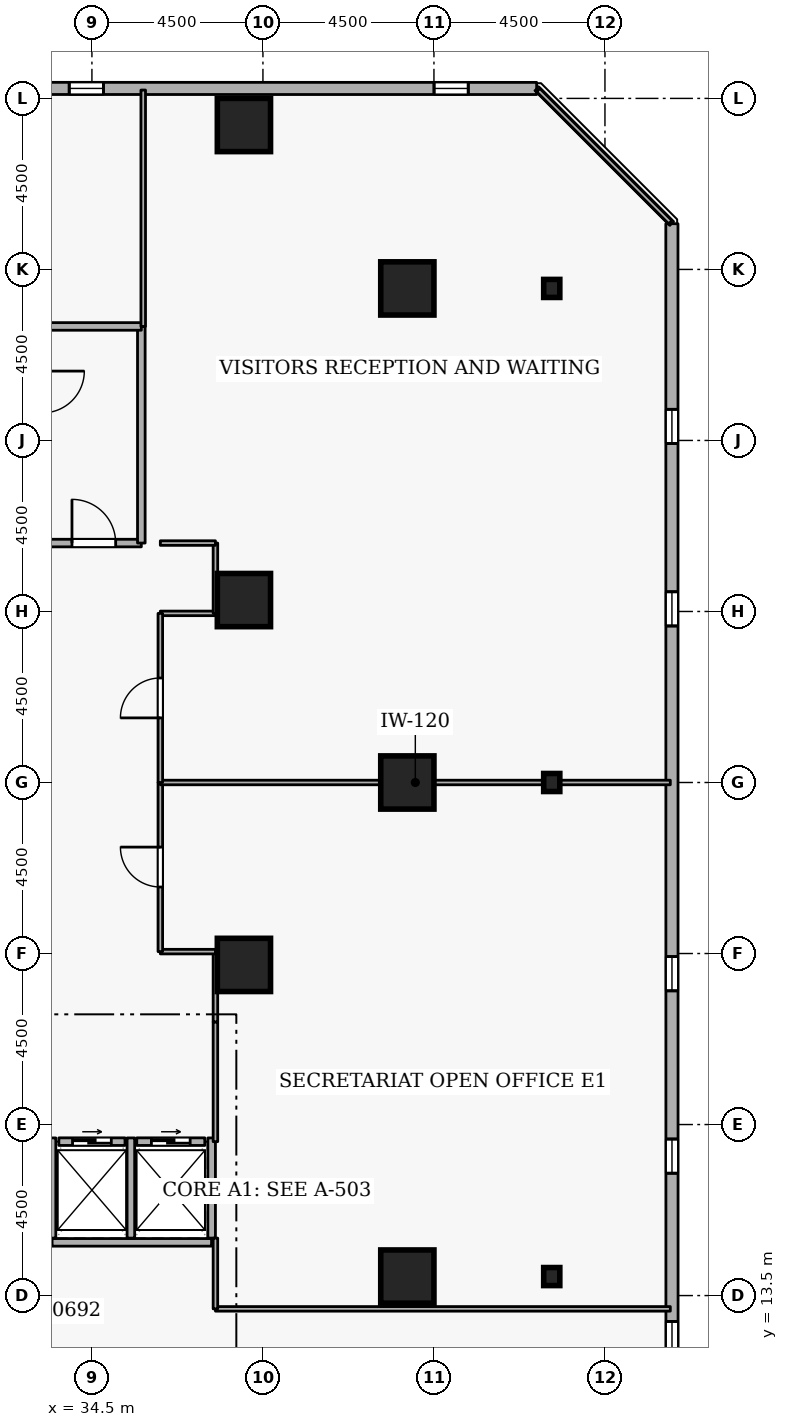
"""IFC4 building model, lengths in metres.
Left out: names, types, materials, properties, quantities, classifications, styles, units other than length and angle.
Written with IfcOpenShell. Run it as: python <this file> out.ifc"""

import sys

from ifc_helpers import new_model, si_unit, direction, frame, frame_2d, origin, origin_2d, place, context, subcontext, project, spatial, rectangle, i_section, extrude, element, fill, save


model = new_model("IFC4")
c1 = context("Model", 3, precision=1e-05, world=origin(), true_north=direction((0.0, 1.0)))
c2 = subcontext(c1, "Body", "Model", "MODEL_VIEW")
j1 = project(units=[si_unit("LENGTHUNIT", "METRE"), si_unit("PLANEANGLEUNIT", "RADIAN")], contexts=[c1])
p1 = place(None, origin())
s1 = spatial("IfcSite", under=j1, at=p1, CompositionType="ELEMENT")
p2 = place(p1, origin())
s2 = spatial("IfcBuilding", under=s1, at=p2, CompositionType="ELEMENT")
p3 = place(p2, frame((0.0, 0.0, 57.3)))
s3 = spatial("IfcBuildingStorey", under=s2, at=p3, CompositionType="ELEMENT", Elevation=57.3)
for number, where, z_axis, x_axis in (
    (1, (42.8, 14.0, 0.0), (0.0, 0.0, 1.0), (1.0, 0.0, 0.0)),
    (2, (42.8, 27.0, 0.0), (0.0, 0.0, 1.0), (1.0, 0.0, 0.0)),
    (3, (42.8, 40.0, 0.0), (0.0, 0.0, 1.0), (1.0, 0.0, 0.0)),
    (4, (38.5, 44.3, 0.0), (0.0, 0.0, 1.0), (1.0, 0.0, 0.0)),
    (5, (38.5, 22.2, 0.0), (0.0, 0.0, 1.0), (1.0, 0.0, 0.0)),
    (6, (38.5, 31.8, 0.0), (0.0, 0.0, 1.0), (1.0, 0.0, 0.0)),
):
    element("IfcColumn", number, at=place(p3, frame(where, z_axis=z_axis, x_axis=x_axis)), inside=s3, PredefinedType="COLUMN", context=c2, shape_type="SweptSolid", body=[
        extrude(rectangle(XDim=1.4, YDim=1.4, at=origin_2d()), origin(), (0.0, 0.0, 1.0), 3.6),
    ])
for number, where, z_axis, x_axis in (
    (7, (46.6, 14.0, 0.0), (0.0, 0.0, 1.0), (1.0, 0.0, 0.0)),
    (8, (46.6, 27.0, 0.0), (0.0, 0.0, 1.0), (1.0, 0.0, 0.0)),
    (9, (46.6, 40.0, 0.0), (0.0, 0.0, 1.0), (1.0, 0.0, 0.0)),
):
    element("IfcColumn", number, at=place(p3, frame(where, z_axis=z_axis, x_axis=x_axis)), inside=s3, PredefinedType="COLUMN", context=c2, shape_type="SweptSolid", body=[
        extrude(i_section(OverallWidth=0.424, OverallDepth=0.475, WebThickness=0.048, FlangeThickness=0.077, FilletRadius=0.015, at=origin_2d()), origin(), (0.0, 0.0, 1.0), 3.6),
    ])
p4 = place(p3, frame((49.765, 5.319, 0.0), z_axis=(0.0, 0.0, 1.0), x_axis=(-8.7231344e-05, 0.999999996195, 0.0)))
e10 = element("IfcWall", 10, at=p4, inside=s3, PredefinedType="STANDARD", context=c2, shape_type="SweptSolid", body=[
    extrude(rectangle(XDim=36.384, YDim=0.32, at=frame_2d((18.192, 0.0))), origin(), (0.0, 0.0, 1.0), 2.7),
])
p5 = place(p4, frame((1.8, 0.0, 0.72)))
e11 = element("IfcOpeningElement", 11, at=p5, cuts=e10, PredefinedType="OPENING", context=c2, shape_type="SweptSolid", body=[
    extrude(rectangle(XDim=0.9, YDim=1.75, at=frame_2d((0.45, 0.875))), frame((0.0, 0.17, 0.0), z_axis=(0.0, -1.0, 0.0), x_axis=(1.0, 0.0, 0.0)), (0.0, 0.0, 1.0), 0.34),
])
p6 = place(p4, frame((6.6, 0.0, 0.72)))
e12 = element("IfcOpeningElement", 12, at=p6, cuts=e10, PredefinedType="OPENING", context=c2, shape_type="SweptSolid", body=[
    extrude(rectangle(XDim=0.9, YDim=1.75, at=frame_2d((0.45, 0.875))), frame((0.0, 0.17, 0.0), z_axis=(0.0, -1.0, 0.0), x_axis=(1.0, 0.0, 0.0)), (0.0, 0.0, 1.0), 0.34),
])
p7 = place(p4, frame((11.4, 0.0, 0.72)))
e13 = element("IfcOpeningElement", 13, at=p7, cuts=e10, PredefinedType="OPENING", context=c2, shape_type="SweptSolid", body=[
    extrude(rectangle(XDim=0.9, YDim=1.75, at=frame_2d((0.45, 0.875))), frame((0.0, 0.17, 0.0), z_axis=(0.0, -1.0, 0.0), x_axis=(1.0, 0.0, 0.0)), (0.0, 0.0, 1.0), 0.34),
])
p8 = place(p4, frame((16.2, 0.0, 0.72)))
e14 = element("IfcOpeningElement", 14, at=p8, cuts=e10, PredefinedType="OPENING", context=c2, shape_type="SweptSolid", body=[
    extrude(rectangle(XDim=0.9, YDim=1.75, at=frame_2d((0.45, 0.875))), frame((0.0, 0.17, 0.0), z_axis=(0.0, -1.0, 0.0), x_axis=(1.0, 0.0, 0.0)), (0.0, 0.0, 1.0), 0.34),
])
p9 = place(p4, frame((25.8, 0.0, 0.72)))
e15 = element("IfcOpeningElement", 15, at=p9, cuts=e10, PredefinedType="OPENING", context=c2, shape_type="SweptSolid", body=[
    extrude(rectangle(XDim=0.9, YDim=1.75, at=frame_2d((0.45, 0.875))), frame((0.0, 0.17, 0.0), z_axis=(0.0, -1.0, 0.0), x_axis=(1.0, 0.0, 0.0)), (0.0, 0.0, 1.0), 0.34),
])
p10 = place(p4, frame((30.6, 0.0, 0.72)))
e16 = element("IfcOpeningElement", 16, at=p10, cuts=e10, PredefinedType="OPENING", context=c2, shape_type="SweptSolid", body=[
    extrude(rectangle(XDim=0.9, YDim=1.75, at=frame_2d((0.45, 0.875))), frame((0.0, 0.17, 0.0), z_axis=(0.0, -1.0, 0.0), x_axis=(1.0, 0.0, 0.0)), (0.0, 0.0, 1.0), 0.34),
])
p11 = place(p3, frame((46.203, 45.262, 0.0), z_axis=(0.0, 0.0, 1.0), x_axis=(-0.999999996195, 8.7231344e-05, 0.0)))
e17 = element("IfcWall", 17, at=p11, inside=s3, PredefinedType="STANDARD", context=c2, shape_type="SweptSolid", body=[
    extrude(rectangle(XDim=36.384, YDim=0.32, at=frame_2d((18.192, 0.0))), origin(), (0.0, 0.0, 1.0), 2.7),
])
p12 = place(p11, frame((1.8, 0.0, 0.72)))
e18 = element("IfcOpeningElement", 18, at=p12, cuts=e17, PredefinedType="OPENING", context=c2, shape_type="SweptSolid", body=[
    extrude(rectangle(XDim=0.9, YDim=1.75, at=frame_2d((0.45, 0.875))), frame((0.0, 0.17, 0.0), z_axis=(0.0, -1.0, 0.0), x_axis=(1.0, 0.0, 0.0)), (0.0, 0.0, 1.0), 0.34),
])
p13 = place(p11, frame((11.4, 0.0, 0.72)))
e19 = element("IfcOpeningElement", 19, at=p13, cuts=e17, PredefinedType="OPENING", context=c2, shape_type="SweptSolid", body=[
    extrude(rectangle(XDim=0.9, YDim=1.75, at=frame_2d((0.45, 0.875))), frame((0.0, 0.17, 0.0), z_axis=(0.0, -1.0, 0.0), x_axis=(1.0, 0.0, 0.0)), (0.0, 0.0, 1.0), 0.34),
])
p14 = place(p11, frame((16.2, 0.0, 0.72)))
e20 = element("IfcOpeningElement", 20, at=p14, cuts=e17, PredefinedType="OPENING", context=c2, shape_type="SweptSolid", body=[
    extrude(rectangle(XDim=0.9, YDim=1.75, at=frame_2d((0.45, 0.875))), frame((0.0, 0.17, 0.0), z_axis=(0.0, -1.0, 0.0), x_axis=(1.0, 0.0, 0.0)), (0.0, 0.0, 1.0), 0.34),
])
p15 = place(p11, frame((25.8, 0.0, 0.72)))
e21 = element("IfcOpeningElement", 21, at=p15, cuts=e17, PredefinedType="OPENING", context=c2, shape_type="SweptSolid", body=[
    extrude(rectangle(XDim=0.9, YDim=1.75, at=frame_2d((0.45, 0.875))), frame((0.0, 0.17, 0.0), z_axis=(0.0, -1.0, 0.0), x_axis=(1.0, 0.0, 0.0)), (0.0, 0.0, 1.0), 0.34),
])
p16 = place(p11, frame((30.6, 0.0, 0.72)))
e22 = element("IfcOpeningElement", 22, at=p16, cuts=e17, PredefinedType="OPENING", context=c2, shape_type="SweptSolid", body=[
    extrude(rectangle(XDim=0.9, YDim=1.75, at=frame_2d((0.45, 0.875))), frame((0.0, 0.17, 0.0), z_axis=(0.0, -1.0, 0.0), x_axis=(1.0, 0.0, 0.0)), (0.0, 0.0, 1.0), 0.34),
])
p17 = place(p3, frame((33.63, 17.55, 0.0), z_axis=(0.0, 0.0, 1.0), x_axis=(1.0, 0.0, 0.0)))
e23 = element("IfcWall", 23, at=p17, inside=s3, PredefinedType="STANDARD", context=c2, shape_type="SweptSolid", body=[
    extrude(rectangle(XDim=1.74, YDim=0.2, at=frame_2d((0.87, 0.0))), origin(), (0.0, 0.0, 1.0), 3.34),
])
p18 = place(p17, frame((0.36, 0.0, 0.0)))
e24 = element("IfcOpeningElement", 24, at=p18, cuts=e23, PredefinedType="OPENING", context=c2, shape_type="SweptSolid", body=[
    extrude(rectangle(XDim=1.02, YDim=2.06, at=frame_2d((0.51, 1.03))), frame((0.0, 0.11, 0.0), z_axis=(0.0, -1.0, 0.0), x_axis=(1.0, 0.0, 0.0)), (0.0, 0.0, 1.0), 0.22),
])
p19 = place(p3, frame((35.68, 17.55, 0.0), z_axis=(0.0, 0.0, 1.0), x_axis=(1.0, 0.0, 0.0)))
e25 = element("IfcWall", 25, at=p19, inside=s3, PredefinedType="STANDARD", context=c2, shape_type="SweptSolid", body=[
    extrude(rectangle(XDim=1.79, YDim=0.2, at=frame_2d((0.895, 0.0))), origin(), (0.0, 0.0, 1.0), 3.34),
])
p20 = place(p19, frame((0.385, 0.0, 0.0)))
e26 = element("IfcOpeningElement", 26, at=p20, cuts=e25, PredefinedType="OPENING", context=c2, shape_type="SweptSolid", body=[
    extrude(rectangle(XDim=1.02, YDim=2.06, at=frame_2d((0.51, 1.03))), frame((0.0, 0.11, 0.0), z_axis=(0.0, -1.0, 0.0), x_axis=(1.0, 0.0, 0.0)), (0.0, 0.0, 1.0), 0.22),
])
p21 = place(p3, frame((33.452, 14.9, 0.0), z_axis=(0.0, 0.0, 1.0), x_axis=(1.0, 0.0, 0.0)))
e27 = element("IfcWall", 27, at=p21, inside=s3, PredefinedType="STANDARD", context=c2, shape_type="SweptSolid", body=[
    extrude(rectangle(XDim=4.196, YDim=0.2, at=frame_2d((2.098, 0.0))), origin(), (0.0, 0.0, 1.0), 3.34),
])
for number, where, z_axis, x_axis in (
    (28, (35.525, 15.012, 0.0), (0.0, 0.0, 1.0), (0.0, 1.0, 0.0)),
    (29, (33.45, 15.012, 0.0), (0.0, 0.0, 1.0), (0.0, 1.0, 0.0)),
    (30, (37.65, 15.012, 0.0), (0.0, 0.0, 1.0), (0.0, 1.0, 0.0)),
):
    element("IfcWall", number, at=place(p3, frame(where, z_axis=z_axis, x_axis=x_axis)), inside=s3, PredefinedType="STANDARD", context=c2, shape_type="SweptSolid", body=[
        extrude(rectangle(XDim=2.636, YDim=0.2, at=frame_2d((1.318, 0.0))), origin(), (0.0, 0.0, 1.0), 3.34),
    ])
p22 = place(p3, frame((33.3, 33.3, 0.0), z_axis=(0.0, 0.0, 1.0), x_axis=(1.0, 0.0, 0.0)))
e31 = element("IfcWall", 31, at=p22, inside=s3, PredefinedType="STANDARD", context=c2, shape_type="SweptSolid", body=[
    extrude(rectangle(XDim=2.5, YDim=0.2, at=frame_2d((1.25, 0.0))), origin(), (0.0, 0.0, 1.0), 3.34),
])
p23 = place(p22, frame((0.675, 0.0, 0.0)))
e32 = element("IfcOpeningElement", 32, at=p23, cuts=e31, PredefinedType="OPENING", context=c2, shape_type="SweptSolid", body=[
    extrude(rectangle(XDim=1.15, YDim=2.1, at=frame_2d((0.575, 1.05))), frame((0.0, 0.11, 0.0), z_axis=(0.0, -1.0, 0.0), x_axis=(1.0, 0.0, 0.0)), (0.0, 0.0, 1.0), 0.22),
])
p24 = place(p3, frame((35.8, 33.3, 0.0), z_axis=(0.0, 0.0, 1.0), x_axis=(0.0, 1.0, 0.0)))
e33 = element("IfcWall", 33, at=p24, inside=s3, PredefinedType="STANDARD", context=c2, shape_type="SweptSolid", body=[
    extrude(rectangle(XDim=5.7, YDim=0.2, at=frame_2d((2.85, 0.0))), origin(), (0.0, 0.0, 1.0), 3.34),
])
p25 = place(p3, frame((35.8, 39.0, 0.0), z_axis=(0.0, 0.0, 1.0), x_axis=(-1.0, 0.0, 0.0)))
e34 = element("IfcWall", 34, at=p25, inside=s3, PredefinedType="STANDARD", context=c2, shape_type="SweptSolid", body=[
    extrude(rectangle(XDim=2.5, YDim=0.2, at=frame_2d((1.25, 0.0))), origin(), (0.0, 0.0, 1.0), 3.34),
])
p26 = place(p3, frame((37.75, 17.55, 0.0), z_axis=(0.0, 0.0, 1.0), x_axis=(0.0, 1.0, 0.0)))
e35 = element("IfcWall", 35, at=p26, inside=s3, PredefinedType="PARTITIONING", context=c2, shape_type="SweptSolid", body=[
    extrude(rectangle(XDim=3.15, YDim=0.12, at=frame_2d((1.575, 0.0))), origin(), (0.0, 0.0, 1.0), 3.34),
])
p27 = place(p3, frame((37.75, 20.7, 0.0), z_axis=(0.0, 0.0, 1.0), x_axis=(0.0, 1.0, 0.0)))
e36 = element("IfcWall", 36, at=p27, inside=s3, PredefinedType="PARTITIONING", context=c2, shape_type="SweptSolid", body=[
    extrude(rectangle(XDim=1.85, YDim=0.12, at=frame_2d((0.925, 0.0))), origin(), (0.0, 0.0, 1.0), 3.34),
])
p28 = place(p3, frame((37.75, 22.55, 0.0), z_axis=(0.0, 0.0, 1.0), x_axis=(-1.0, 0.0, 0.0)))
e37 = element("IfcWall", 37, at=p28, inside=s3, PredefinedType="PARTITIONING", context=c2, shape_type="SweptSolid", body=[
    extrude(rectangle(XDim=1.45, YDim=0.12, at=frame_2d((0.725, 0.0))), origin(), (0.0, 0.0, 1.0), 3.34),
])
p29 = place(p3, frame((36.3, 22.55, 0.0), z_axis=(0.0, 0.0, 1.0), x_axis=(0.0, 1.0, 0.0)))
e38 = element("IfcWall", 38, at=p29, inside=s3, PredefinedType="PARTITIONING", context=c2, shape_type="SweptSolid", body=[
    extrude(rectangle(XDim=4.45, YDim=0.12, at=frame_2d((2.225, 0.0))), origin(), (0.0, 0.0, 1.0), 3.34),
])
p30 = place(p29, frame((1.7, 0.0, 0.0)))
e39 = element("IfcOpeningElement", 39, at=p30, cuts=e38, PredefinedType="OPENING", context=c2, shape_type="SweptSolid", body=[
    extrude(rectangle(XDim=1.05, YDim=2.1, at=frame_2d((0.525, 1.05))), frame((0.0, 0.07, 0.0), z_axis=(0.0, -1.0, 0.0), x_axis=(1.0, 0.0, 0.0)), (0.0, 0.0, 1.0), 0.14),
])
p31 = place(p3, frame((36.3, 27.0, 0.0), z_axis=(0.0, 0.0, 1.0), x_axis=(1.0, 0.0, 0.0)))
e40 = element("IfcWall", 40, at=p31, inside=s3, PredefinedType="PARTITIONING", context=c2, shape_type="SweptSolid", body=[
    extrude(rectangle(XDim=13.42, YDim=0.12, at=frame_2d((6.71, 0.0))), origin(), (0.0, 0.0, 1.0), 2.932),
])
p32 = place(p3, frame((49.72, 13.15, 0.0), z_axis=(0.0, 0.0, 1.0), x_axis=(-1.0, 0.0, 0.0)))
e41 = element("IfcWall", 41, at=p32, inside=s3, PredefinedType="PARTITIONING", context=c2, shape_type="SweptSolid", body=[
    extrude(rectangle(XDim=11.97, YDim=0.12, at=frame_2d((5.985, 0.0))), origin(), (0.0, 0.0, 1.0), 3.34),
])
p33 = place(p3, frame((37.75, 13.15, 0.0), z_axis=(0.0, 0.0, 1.0), x_axis=(0.0, 1.0, 0.0)))
e42 = element("IfcWall", 42, at=p33, inside=s3, PredefinedType="PARTITIONING", context=c2, shape_type="SweptSolid", body=[
    extrude(rectangle(XDim=1.862, YDim=0.12, at=frame_2d((0.931, 0.0))), origin(), (0.0, 0.0, 1.0), 3.34),
])
p34 = place(p3, frame((36.3, 31.45, 0.0), z_axis=(0.0, 0.0, 1.0), x_axis=(1.0, 0.0, 0.0)))
e43 = element("IfcWall", 43, at=p34, inside=s3, PredefinedType="PARTITIONING", context=c2, shape_type="SweptSolid", body=[
    extrude(rectangle(XDim=1.45, YDim=0.12, at=frame_2d((0.725, 0.0))), origin(), (0.0, 0.0, 1.0), 3.34),
])
p35 = place(p3, frame((37.75, 31.45, 0.0), z_axis=(0.0, 0.0, 1.0), x_axis=(0.0, 1.0, 0.0)))
e44 = element("IfcWall", 44, at=p35, inside=s3, PredefinedType="PARTITIONING", context=c2, shape_type="SweptSolid", body=[
    extrude(rectangle(XDim=1.85, YDim=0.12, at=frame_2d((0.925, 0.0))), origin(), (0.0, 0.0, 1.0), 3.34),
])
p36 = place(p3, frame((37.75, 33.3, 0.0), z_axis=(0.0, 0.0, 1.0), x_axis=(-1.0, 0.0, 0.0)))
e45 = element("IfcWall", 45, at=p36, inside=s3, PredefinedType="PARTITIONING", context=c2, shape_type="SweptSolid", body=[
    extrude(rectangle(XDim=1.45, YDim=0.12, at=frame_2d((0.725, 0.0))), origin(), (0.0, 0.0, 1.0), 3.34),
])
p37 = place(p3, frame((35.85, 39.0, 0.0), z_axis=(0.0, 0.0, 1.0), x_axis=(0.0, 1.0, 0.0)))
e46 = element("IfcWall", 46, at=p37, inside=s3, PredefinedType="PARTITIONING", context=c2, shape_type="SweptSolid", body=[
    extrude(rectangle(XDim=6.22, YDim=0.12, at=frame_2d((3.11, 0.0))), origin(), (0.0, 0.0, 1.0), 3.34),
])
p38 = place(p3, frame((46.243, 45.22, 0.0), z_axis=(0.0, 0.0, 1.0), x_axis=(0.707106781187, -0.707106781187, 0.0)))
e47 = element("IfcWall", 47, at=p38, inside=s3, PredefinedType="PARTITIONING", context=c2, shape_type="SweptSolid", body=[
    extrude(rectangle(XDim=4.917, YDim=0.12, at=frame_2d((2.458, 0.0))), origin(), (0.0, 0.0, 1.0), 3.34),
])
p39 = place(p3, frame((36.3, 27.0, 0.0), z_axis=(0.0, 0.0, 1.0), x_axis=(0.0, 1.0, 0.0)))
e48 = element("IfcWall", 48, at=p39, inside=s3, PredefinedType="PARTITIONING", context=c2, shape_type="SweptSolid", body=[
    extrude(rectangle(XDim=4.45, YDim=0.12, at=frame_2d((2.225, 0.0))), origin(), (0.0, 0.0, 1.0), 3.34),
])
p40 = place(p39, frame((1.7, 0.0, 0.0)))
e49 = element("IfcOpeningElement", 49, at=p40, cuts=e48, PredefinedType="OPENING", context=c2, shape_type="SweptSolid", body=[
    extrude(rectangle(XDim=1.05, YDim=2.1, at=frame_2d((0.525, 1.05))), frame((0.0, 0.07, 0.0), z_axis=(0.0, -1.0, 0.0), x_axis=(1.0, 0.0, 0.0)), (0.0, 0.0, 1.0), 0.14),
])
p41 = place(p6, origin())
e50 = element("IfcWindow", 50, at=p41, inside=s3, PartitioningType="SINGLE_PANEL", PredefinedType="WINDOW", context=c2, shape_type="SweptSolid", body=[
    extrude(rectangle(XDim=0.9, YDim=1.75, at=frame_2d((0.45, 0.875))), frame((0.0, 0.03, 0.0), z_axis=(0.0, -1.0, 0.0), x_axis=(1.0, 0.0, 0.0)), (0.0, 0.0, 1.0), 0.06),
])
fill(e12, e50)
p42 = place(p7, origin())
e51 = element("IfcWindow", 51, at=p42, inside=s3, PartitioningType="SINGLE_PANEL", PredefinedType="WINDOW", context=c2, shape_type="SweptSolid", body=[
    extrude(rectangle(XDim=0.9, YDim=1.75, at=frame_2d((0.45, 0.875))), frame((0.0, 0.03, 0.0), z_axis=(0.0, -1.0, 0.0), x_axis=(1.0, 0.0, 0.0)), (0.0, 0.0, 1.0), 0.06),
])
fill(e13, e51)
p43 = place(p8, origin())
e52 = element("IfcWindow", 52, at=p43, inside=s3, PartitioningType="SINGLE_PANEL", PredefinedType="WINDOW", context=c2, shape_type="SweptSolid", body=[
    extrude(rectangle(XDim=0.9, YDim=1.75, at=frame_2d((0.45, 0.875))), frame((0.0, 0.03, 0.0), z_axis=(0.0, -1.0, 0.0), x_axis=(1.0, 0.0, 0.0)), (0.0, 0.0, 1.0), 0.06),
])
fill(e14, e52)
p44 = place(p9, origin())
e53 = element("IfcWindow", 53, at=p44, inside=s3, PartitioningType="SINGLE_PANEL", PredefinedType="WINDOW", context=c2, shape_type="SweptSolid", body=[
    extrude(rectangle(XDim=0.9, YDim=1.75, at=frame_2d((0.45, 0.875))), frame((0.0, 0.03, 0.0), z_axis=(0.0, -1.0, 0.0), x_axis=(1.0, 0.0, 0.0)), (0.0, 0.0, 1.0), 0.06),
])
fill(e15, e53)
p45 = place(p10, origin())
e54 = element("IfcWindow", 54, at=p45, inside=s3, PartitioningType="SINGLE_PANEL", PredefinedType="WINDOW", context=c2, shape_type="SweptSolid", body=[
    extrude(rectangle(XDim=0.9, YDim=1.75, at=frame_2d((0.45, 0.875))), frame((0.0, 0.03, 0.0), z_axis=(0.0, -1.0, 0.0), x_axis=(1.0, 0.0, 0.0)), (0.0, 0.0, 1.0), 0.06),
])
fill(e16, e54)
p46 = place(p12, origin())
e55 = element("IfcWindow", 55, at=p46, inside=s3, PartitioningType="SINGLE_PANEL", PredefinedType="WINDOW", context=c2, shape_type="SweptSolid", body=[
    extrude(rectangle(XDim=0.9, YDim=1.75, at=frame_2d((0.45, 0.875))), frame((0.0, 0.03, 0.0), z_axis=(0.0, -1.0, 0.0), x_axis=(1.0, 0.0, 0.0)), (0.0, 0.0, 1.0), 0.06),
])
fill(e18, e55)
p47 = place(p13, origin())
e56 = element("IfcWindow", 56, at=p47, inside=s3, PartitioningType="SINGLE_PANEL", PredefinedType="WINDOW", context=c2, shape_type="SweptSolid", body=[
    extrude(rectangle(XDim=0.9, YDim=1.75, at=frame_2d((0.45, 0.875))), frame((0.0, 0.03, 0.0), z_axis=(0.0, -1.0, 0.0), x_axis=(1.0, 0.0, 0.0)), (0.0, 0.0, 1.0), 0.06),
])
fill(e19, e56)
p48 = place(p18, origin())
e57 = element("IfcDoor", 57, at=p48, inside=s3, OperationType="SLIDING_TO_LEFT", PredefinedType="DOOR", context=c2, shape_type="SweptSolid", body=[
    extrude(rectangle(XDim=1.02, YDim=2.06, at=frame_2d((0.51, 1.03))), frame((0.0, 0.025, 0.0), z_axis=(0.0, -1.0, 0.0), x_axis=(1.0, 0.0, 0.0)), (0.0, 0.0, 1.0), 0.05),
])
fill(e24, e57)
p49 = place(p20, origin())
e58 = element("IfcDoor", 58, at=p49, inside=s3, OperationType="SLIDING_TO_LEFT", PredefinedType="DOOR", context=c2, shape_type="SweptSolid", body=[
    extrude(rectangle(XDim=1.02, YDim=2.06, at=frame_2d((0.51, 1.03))), frame((0.0, 0.025, 0.0), z_axis=(0.0, -1.0, 0.0), x_axis=(1.0, 0.0, 0.0)), (0.0, 0.0, 1.0), 0.05),
])
fill(e26, e58)
p50 = place(p23, origin())
e59 = element("IfcDoor", 59, at=p50, inside=s3, OperationType="SINGLE_SWING_LEFT", PredefinedType="DOOR", context=c2, shape_type="SweptSolid", body=[
    extrude(rectangle(XDim=1.15, YDim=2.1, at=frame_2d((0.575, 1.05))), frame((0.0, 0.025, 0.0), z_axis=(0.0, -1.0, 0.0), x_axis=(1.0, 0.0, 0.0)), (0.0, 0.0, 1.0), 0.05),
])
fill(e32, e59)
p51 = place(p30, origin())
e60 = element("IfcDoor", 60, at=p51, inside=s3, OperationType="SINGLE_SWING_RIGHT", PredefinedType="DOOR", context=c2, shape_type="SweptSolid", body=[
    extrude(rectangle(XDim=1.05, YDim=2.1, at=frame_2d((0.525, 1.05))), frame((0.0, 0.025, 0.0), z_axis=(0.0, -1.0, 0.0), x_axis=(1.0, 0.0, 0.0)), (0.0, 0.0, 1.0), 0.05),
])
fill(e39, e60)
p52 = place(p40, origin())
e61 = element("IfcDoor", 61, at=p52, inside=s3, OperationType="SINGLE_SWING_LEFT", PredefinedType="DOOR", context=c2, shape_type="SweptSolid", body=[
    extrude(rectangle(XDim=1.05, YDim=2.1, at=frame_2d((0.525, 1.05))), frame((0.0, 0.025, 0.0), z_axis=(0.0, -1.0, 0.0), x_axis=(1.0, 0.0, 0.0)), (0.0, 0.0, 1.0), 0.05),
])
fill(e49, e61)
save(model, sys.argv[1])
